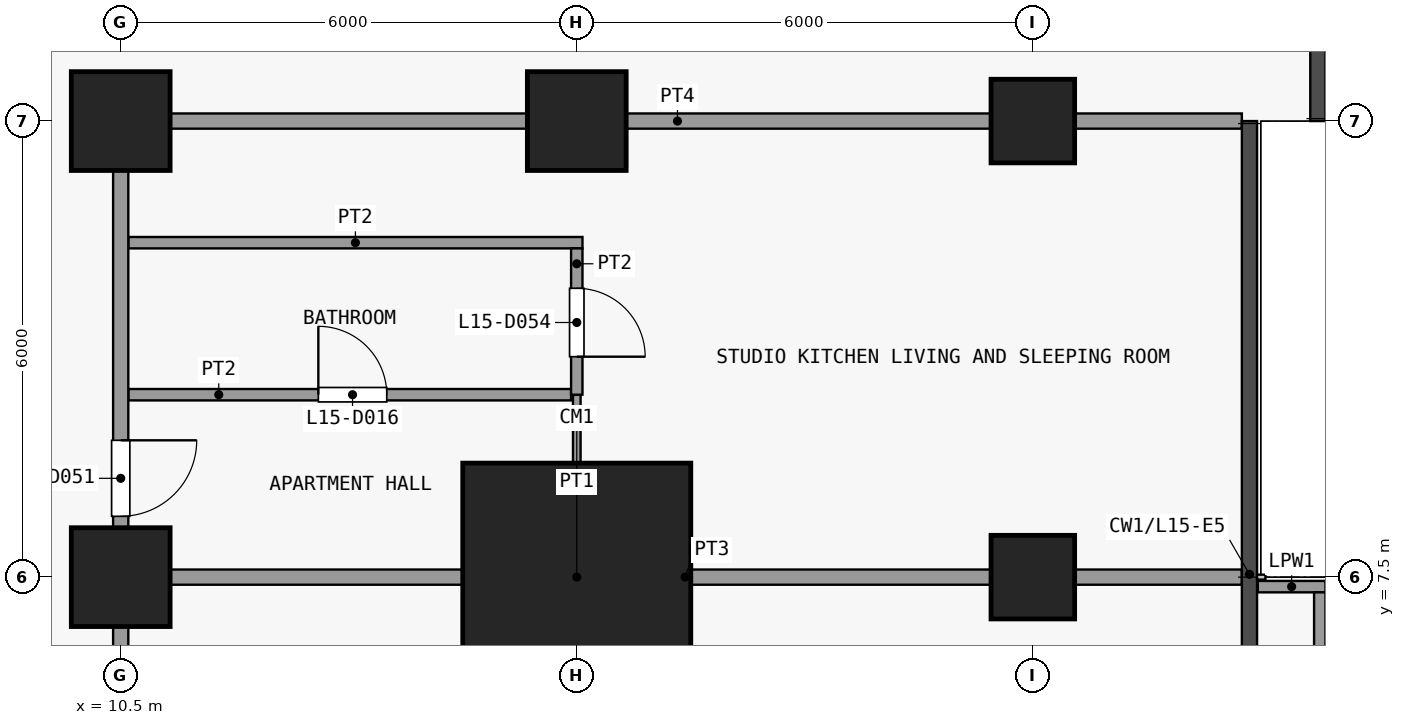
"""IFC4 building model, lengths in metres.
Left out: names, types, materials, properties, quantities, classifications, styles, units other than length and angle.
Written with IfcOpenShell. Run it as: python <this file> out.ifc"""

import sys

from ifc_helpers import new_model, si_unit, direction, frame, frame_2d, origin, origin_2d, place, context, subcontext, project, spatial, rectangle, extrude, element, fill, save


model = new_model("IFC4")
c1 = context("Model", 3, precision=1e-05, world=origin(), true_north=direction((0.0, 1.0)))
c2 = subcontext(c1, "Body", "Model", "MODEL_VIEW")
j1 = project(units=[si_unit("LENGTHUNIT", "METRE"), si_unit("PLANEANGLEUNIT", "RADIAN")], contexts=[c1])
p1 = place(None, origin())
s1 = spatial("IfcSite", under=j1, at=p1, CompositionType="ELEMENT")
p2 = place(p1, origin())
s2 = spatial("IfcBuilding", under=s1, at=p2, CompositionType="ELEMENT")
p3 = place(p2, frame((0.0, 0.0, 64.9)))
s3 = spatial("IfcBuildingStorey", under=s2, at=p3, CompositionType="ELEMENT", Elevation=64.9)
for number, where, z_axis, x_axis in (
    (1, (10.5, 7.5, 0.0), (0.0, 0.0, 1.0), (1.0, 0.0, 0.0)),
    (2, (10.5, 13.5, 0.0), (0.0, 0.0, 1.0), (1.0, 0.0, 0.0)),
):
    element("IfcColumn", number, at=place(p3, frame(where, z_axis=z_axis, x_axis=x_axis)), inside=s3, PredefinedType="COLUMN", context=c2, shape_type="SweptSolid", body=[
        extrude(rectangle(XDim=1.3, YDim=1.3, at=origin_2d()), origin(), (0.0, 0.0, 1.0), 3.6),
    ])
p4 = place(p3, frame((16.5, 7.5, 0.0), z_axis=(0.0, 0.0, 1.0), x_axis=(1.0, 0.0, 0.0)))
e3 = element("IfcColumn", 3, at=p4, inside=s3, PredefinedType="COLUMN", context=c2, shape_type="SweptSolid", body=[
    extrude(rectangle(XDim=3.0, YDim=3.0, at=origin_2d()), origin(), (0.0, 0.0, 1.0), 3.6),
])
p5 = place(p3, frame((16.5, 13.5, 0.0), z_axis=(0.0, 0.0, 1.0), x_axis=(1.0, 0.0, 0.0)))
e4 = element("IfcColumn", 4, at=p5, inside=s3, PredefinedType="COLUMN", context=c2, shape_type="SweptSolid", body=[
    extrude(rectangle(XDim=1.3, YDim=1.3, at=origin_2d()), origin(), (0.0, 0.0, 1.0), 3.6),
])
for number, where, z_axis, x_axis in (
    (5, (22.5, 7.5, 0.0), (0.0, 0.0, 1.0), (1.0, 0.0, 0.0)),
    (6, (22.5, 13.5, 0.0), (0.0, 0.0, 1.0), (1.0, 0.0, 0.0)),
):
    element("IfcColumn", number, at=place(p3, frame(where, z_axis=z_axis, x_axis=x_axis)), inside=s3, PredefinedType="COLUMN", context=c2, shape_type="SweptSolid", body=[
        extrude(rectangle(XDim=1.1, YDim=1.1, at=origin_2d()), origin(), (0.0, 0.0, 1.0), 3.6),
    ])
p6 = place(p3, frame((25.46, 7.375, 0.0), z_axis=(0.0, 0.0, 1.0), x_axis=(1.0, 0.0, 0.0)))
e7 = element("IfcWall", 7, at=p6, inside=s3, PredefinedType="PARAPET", context=c2, shape_type="SweptSolid", body=[
    extrude(rectangle(XDim=0.89, YDim=0.15, at=frame_2d((0.445, 0.0))), origin(), (0.0, 0.0, 1.0), 1.15),
])
p7 = place(p3, frame((26.275, 7.3, 0.0), z_axis=(0.0, 0.0, 1.0), x_axis=(0.0, -1.0, 0.0)))
e8 = element("IfcWall", 8, at=p7, inside=s3, PredefinedType="PARAPET", context=c2, shape_type="SweptSolid", body=[
    extrude(rectangle(XDim=5.75, YDim=0.15, at=frame_2d((2.875, 0.0))), origin(), (0.0, 0.0, 1.0), 1.15),
])
p8 = place(p3, frame((10.6, 7.5, 0.0), z_axis=(0.0, 0.0, 1.0), x_axis=(1.0, 0.0, 0.0)))
e9 = element("IfcWall", 9, at=p8, inside=s3, PredefinedType="PARTITIONING", context=c2, shape_type="SweptSolid", body=[
    extrude(rectangle(XDim=14.65, YDim=0.2, at=frame_2d((7.325, 0.0))), origin(), (0.0, 0.0, 1.0), 3.3),
])
p9 = place(p3, frame((10.6, 9.9, 0.0), z_axis=(0.0, 0.0, 1.0), x_axis=(1.0, 0.0, 0.0)))
e10 = element("IfcWall", 10, at=p9, inside=s3, PredefinedType="PARTITIONING", context=c2, shape_type="SweptSolid", body=[
    extrude(rectangle(XDim=5.825, YDim=0.15, at=frame_2d((2.913, 0.0))), origin(), (0.0, 0.0, 1.0), 3.3),
])
p10 = place(p9, frame((2.5, 0.0, 0.0)))
e11 = element("IfcOpeningElement", 11, at=p10, cuts=e10, PredefinedType="OPENING", context=c2, shape_type="SweptSolid", body=[
    extrude(rectangle(XDim=0.9, YDim=2.1, at=frame_2d((0.45, 1.05))), frame((0.0, 0.085, 0.0), z_axis=(0.0, -1.0, 0.0), x_axis=(1.0, 0.0, 0.0)), (0.0, 0.0, 1.0), 0.17),
])
p11 = place(p3, frame((10.6, 11.9, 0.0), z_axis=(0.0, 0.0, 1.0), x_axis=(1.0, 0.0, 0.0)))
e12 = element("IfcWall", 12, at=p11, inside=s3, PredefinedType="PARTITIONING", context=c2, shape_type="SweptSolid", body=[
    extrude(rectangle(XDim=5.975, YDim=0.15, at=frame_2d((2.987, 0.0))), origin(), (0.0, 0.0, 1.0), 3.3),
])
p12 = place(p3, frame((10.4, 13.5, 0.0), z_axis=(0.0, 0.0, 1.0), x_axis=(1.0, 0.0, 0.0)))
e13 = element("IfcWall", 13, at=p12, inside=s3, PredefinedType="PARTITIONING", context=c2, shape_type="SweptSolid", body=[
    extrude(rectangle(XDim=14.85, YDim=0.2, at=frame_2d((7.425, 0.0))), origin(), (0.0, 0.0, 1.0), 3.3),
])
p13 = place(p3, frame((10.5, -4.4, 0.0), z_axis=(0.0, 0.0, 1.0), x_axis=(0.0, 1.0, 0.0)))
e14 = element("IfcWall", 14, at=p13, inside=s3, PredefinedType="PARTITIONING", context=c2, shape_type="SweptSolid", body=[
    extrude(rectangle(XDim=17.8, YDim=0.2, at=frame_2d((8.9, 0.0))), origin(), (0.0, 0.0, 1.0), 3.3),
])
p14 = place(p13, frame((6.6, 0.0, 0.0)))
e15 = element("IfcOpeningElement", 15, at=p14, cuts=e14, PredefinedType="OPENING", context=c2, shape_type="SweptSolid", body=[
    extrude(rectangle(XDim=1.0, YDim=2.1, at=frame_2d((0.5, 1.05))), frame((0.0, 0.11, 0.0), z_axis=(0.0, -1.0, 0.0), x_axis=(1.0, 0.0, 0.0)), (0.0, 0.0, 1.0), 0.22),
])
p15 = place(p13, frame((12.7, 0.0, 0.0)))
e16 = element("IfcOpeningElement", 16, at=p15, cuts=e14, PredefinedType="OPENING", context=c2, shape_type="SweptSolid", body=[
    extrude(rectangle(XDim=1.0, YDim=2.1, at=frame_2d((0.5, 1.05))), frame((0.0, 0.11, 0.0), z_axis=(0.0, -1.0, 0.0), x_axis=(1.0, 0.0, 0.0)), (0.0, 0.0, 1.0), 0.22),
])
p16 = place(p3, frame((16.5, 7.6, 0.0), z_axis=(0.0, 0.0, 1.0), x_axis=(0.0, 1.0, 0.0)))
e17 = element("IfcWall", 17, at=p16, inside=s3, PredefinedType="PARTITIONING", context=c2, shape_type="SweptSolid", body=[
    extrude(rectangle(XDim=2.3, YDim=0.1, at=frame_2d((1.15, 0.0))), origin(), (0.0, 0.0, 1.0), 3.3),
])
p17 = place(p3, frame((16.5, 3.9, 0.0), z_axis=(0.0, 0.0, 1.0), x_axis=(0.0, 1.0, 0.0)))
e18 = element("IfcWall", 18, at=p17, inside=s3, PredefinedType="PARTITIONING", context=c2, shape_type="SweptSolid", body=[
    extrude(rectangle(XDim=3.5, YDim=0.15, at=frame_2d((1.75, 0.0))), origin(), (0.0, 0.0, 1.0), 3.3),
])
p18 = place(p3, frame((16.5, 9.9, 0.0), z_axis=(0.0, 0.0, 1.0), x_axis=(0.0, 1.0, 0.0)))
e19 = element("IfcWall", 19, at=p18, inside=s3, PredefinedType="PARTITIONING", context=c2, shape_type="SweptSolid", body=[
    extrude(rectangle(XDim=1.925, YDim=0.15, at=frame_2d((0.962, 0.0))), origin(), (0.0, 0.0, 1.0), 3.3),
])
p19 = place(p18, frame((0.5, 0.0, 0.0)))
e20 = element("IfcOpeningElement", 20, at=p19, cuts=e19, PredefinedType="OPENING", context=c2, shape_type="SweptSolid", body=[
    extrude(rectangle(XDim=0.9, YDim=2.1, at=frame_2d((0.45, 1.05))), frame((0.0, 0.085, 0.0), z_axis=(0.0, -1.0, 0.0), x_axis=(1.0, 0.0, 0.0)), (0.0, 0.0, 1.0), 0.17),
])
p20 = place(p10, origin())
e21 = element("IfcDoor", 21, at=p20, inside=s3, OperationType="SINGLE_SWING_RIGHT", PredefinedType="DOOR", context=c2, shape_type="SweptSolid", body=[
    extrude(rectangle(XDim=0.9, YDim=2.1, at=frame_2d((0.45, 1.05))), frame((0.0, 0.025, 0.0), z_axis=(0.0, -1.0, 0.0), x_axis=(1.0, 0.0, 0.0)), (0.0, 0.0, 1.0), 0.05),
])
fill(e11, e21)
p21 = place(p15, origin())
e22 = element("IfcDoor", 22, at=p21, inside=s3, OperationType="SINGLE_SWING_RIGHT", PredefinedType="DOOR", context=c2, shape_type="SweptSolid", body=[
    extrude(rectangle(XDim=1.0, YDim=2.1, at=frame_2d((0.5, 1.05))), frame((0.0, 0.025, 0.0), z_axis=(0.0, -1.0, 0.0), x_axis=(1.0, 0.0, 0.0)), (0.0, 0.0, 1.0), 0.05),
])
fill(e16, e22)
p22 = place(p19, origin())
e23 = element("IfcDoor", 23, at=p22, inside=s3, OperationType="SINGLE_SWING_LEFT", PredefinedType="DOOR", context=c2, shape_type="SweptSolid", body=[
    extrude(rectangle(XDim=0.9, YDim=2.1, at=frame_2d((0.45, 1.05))), frame((0.0, 0.025, 0.0), z_axis=(0.0, -1.0, 0.0), x_axis=(1.0, 0.0, 0.0)), (0.0, 0.0, 1.0), 0.05),
])
fill(e20, e23)
save(model, sys.argv[1])
